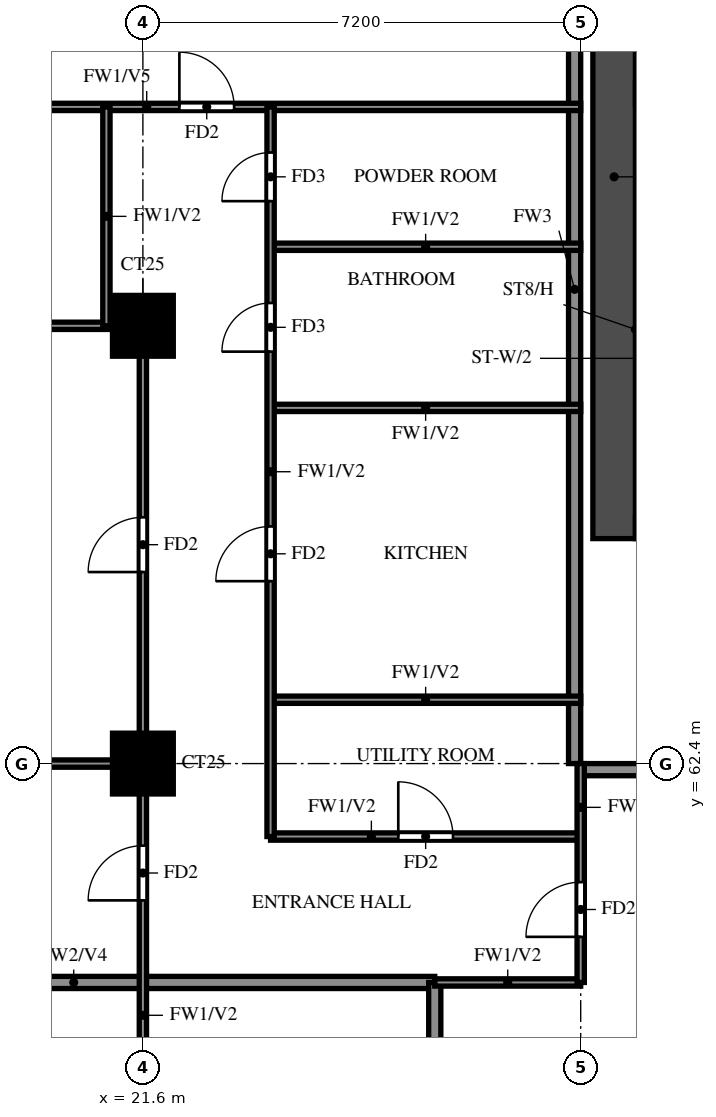
"""IFC4 building model, lengths in metres.
Left out: names, types, materials, properties, quantities, classifications, styles, units other than length and angle.
Written with IfcOpenShell. Run it as: python <this file> out.ifc"""

import sys

from ifc_helpers import new_model, si_unit, direction, frame, frame_2d, origin, origin_2d, place, context, subcontext, project, spatial, rectangle, extrude, source, transform, mapped, element, fill, save


model = new_model("IFC4")
c1 = context("Model", 3, precision=1e-05, world=origin(), true_north=direction((0.0, 1.0)))
c2 = subcontext(c1, "Body", "Model", "MODEL_VIEW")
j1 = project(units=[si_unit("LENGTHUNIT", "METRE"), si_unit("PLANEANGLEUNIT", "RADIAN")], contexts=[c1])
p1 = place(None, origin())
s1 = spatial("IfcSite", under=j1, at=p1, CompositionType="ELEMENT")
p2 = place(p1, origin())
s2 = spatial("IfcBuilding", under=s1, at=p2, CompositionType="ELEMENT")
p3 = place(p2, frame((0.0, 0.0, 153.5)))
s3 = spatial("IfcBuildingStorey", under=s2, at=p3, CompositionType="ELEMENT", Elevation=153.5)
m1 = source(origin(), c2, "Body", "SweptSolid", [
    extrude(rectangle(XDim=1.0, YDim=1.0, at=origin_2d()), origin(), (0.0, 0.0, 1.0), 3.2),
])
for number, where, z_axis, x_axis in (
    (1, (21.6, 62.4, 0.0), (0.0, 0.0, 1.0), (1.0, 0.0, 0.0)),
    (2, (21.6, 69.6, 0.0), (0.0, 0.0, 1.0), (1.0, 0.0, 0.0)),
):
    element("IfcColumn", number, at=place(p3, frame(where, z_axis=z_axis, x_axis=x_axis)), inside=s3, PredefinedType="COLUMN", context=c2, shape_type="MappedRepresentation", body=[
        mapped(m1, transform((0.0, 0.0, 0.0))),
    ])
p4 = place(p3, frame((29.35, 66.1, 0.0), z_axis=(0.0, 0.0, 1.0), x_axis=(0.0, 1.0, 0.0)))
e3 = element("IfcWall", 3, at=p4, inside=s3, PredefinedType="SHEAR", context=c2, shape_type="SweptSolid", body=[
    extrude(rectangle(XDim=11.9, YDim=0.7, at=frame_2d((5.95, 0.0))), origin(), (0.0, 0.0, 1.0), 3.2),
])
p5 = place(p3, frame((28.8, 62.3, 0.0), z_axis=(0.0, 0.0, 1.0), x_axis=(1.0, 0.0, 0.0)))
e4 = element("IfcWall", 4, at=p5, inside=s3, PredefinedType="SOLIDWALL", context=c2, shape_type="SweptSolid", body=[
    extrude(rectangle(XDim=4.8, YDim=0.2, at=frame_2d((2.4, 0.0))), origin(), (0.0, 0.0, 1.0), 3.2),
])
p6 = place(p3, frame((28.7, 62.4, 0.0), z_axis=(0.0, 0.0, 1.0), x_axis=(0.0, 1.0, 0.0)))
e5 = element("IfcWall", 5, at=p6, inside=s3, PredefinedType="SOLIDWALL", context=c2, shape_type="SweptSolid", body=[
    extrude(rectangle(XDim=15.6, YDim=0.2, at=frame_2d((7.8, 0.0))), origin(), (0.0, 0.0, 1.0), 3.2),
])
p7 = place(p3, frame((14.525, 58.8, 0.0), z_axis=(0.0, 0.0, 1.0), x_axis=(1.0, 0.0, 0.0)))
e6 = element("IfcWall", 6, at=p7, inside=s3, PredefinedType="SOLIDWALL", context=c2, shape_type="SweptSolid", body=[
    extrude(rectangle(XDim=11.875, YDim=0.2, at=frame_2d((5.938, 0.0))), origin(), (0.0, 0.0, 1.0), 2.3),
])
p8 = place(p3, frame((26.4, 56.4, 0.0), z_axis=(0.0, 0.0, 1.0), x_axis=(0.0, 1.0, 0.0)))
e7 = element("IfcWall", 7, at=p8, inside=s3, PredefinedType="SOLIDWALL", context=c2, shape_type="SweptSolid", body=[
    extrude(rectangle(XDim=2.4, YDim=0.2, at=frame_2d((1.2, 0.0))), origin(), (0.0, 0.0, 1.0), 3.2),
])
p9 = place(p3, frame((26.4, 58.8, 0.0), z_axis=(0.0, 0.0, 1.0), x_axis=(1.0, 0.0, 0.0)))
e8 = element("IfcWall", 8, at=p9, inside=s3, PredefinedType="PARTITIONING", context=c2, shape_type="SweptSolid", body=[
    extrude(rectangle(XDim=2.4, YDim=0.12, at=frame_2d((1.2, 0.0))), origin(), (0.0, 0.0, 1.0), 3.2),
])
p10 = place(p3, frame((23.7, 61.2, 0.0), z_axis=(0.0, 0.0, 1.0), x_axis=(1.0, 0.0, 0.0)))
e9 = element("IfcWall", 9, at=p10, inside=s3, PredefinedType="PARTITIONING", context=c2, shape_type="SweptSolid", body=[
    extrude(rectangle(XDim=5.1, YDim=0.12, at=frame_2d((2.55, 0.0))), origin(), (0.0, 0.0, 1.0), 3.2),
])
p11 = place(p10, frame((2.1, 0.0, 0.0)))
e10 = element("IfcOpeningElement", 10, at=p11, cuts=e9, PredefinedType="OPENING", context=c2, shape_type="SweptSolid", body=[
    extrude(rectangle(XDim=0.9, YDim=2.1, at=frame_2d((0.45, 1.05))), frame((0.0, 0.07, 0.0), z_axis=(0.0, -1.0, 0.0), x_axis=(1.0, 0.0, 0.0)), (0.0, 0.0, 1.0), 0.14),
])
p12 = place(p3, frame((14.525, 62.4, 0.0), z_axis=(0.0, 0.0, 1.0), x_axis=(1.0, 0.0, 0.0)))
e11 = element("IfcWall", 11, at=p12, inside=s3, PredefinedType="PARTITIONING", context=c2, shape_type="SweptSolid", body=[
    extrude(rectangle(XDim=7.075, YDim=0.12, at=frame_2d((3.538, 0.0))), origin(), (0.0, 0.0, 1.0), 3.2),
])
for number, where, z_axis, x_axis in (
    (12, (23.7, 63.45, 0.0), (0.0, 0.0, 1.0), (1.0, 0.0, 0.0)),
    (13, (23.7, 68.25, 0.0), (0.0, 0.0, 1.0), (1.0, 0.0, 0.0)),
):
    element("IfcWall", number, at=place(p3, frame(where, z_axis=z_axis, x_axis=x_axis)), inside=s3, PredefinedType="PARTITIONING", context=c2, shape_type="SweptSolid", body=[
        extrude(rectangle(XDim=5.1, YDim=0.12, at=frame_2d((2.55, 0.0))), origin(), (0.0, 0.0, 1.0), 3.2),
    ])
p13 = place(p3, frame((14.525, 69.6, 0.0), z_axis=(0.0, 0.0, 1.0), x_axis=(1.0, 0.0, 0.0)))
e14 = element("IfcWall", 14, at=p13, inside=s3, PredefinedType="PARTITIONING", context=c2, shape_type="SweptSolid", body=[
    extrude(rectangle(XDim=7.075, YDim=0.12, at=frame_2d((3.538, 0.0))), origin(), (0.0, 0.0, 1.0), 3.2),
])
p14 = place(p13, frame((2.837, 0.0, 0.0)))
e15 = element("IfcOpeningElement", 15, at=p14, cuts=e14, PredefinedType="OPENING", context=c2, shape_type="SweptSolid", body=[
    extrude(rectangle(XDim=0.8, YDim=2.1, at=frame_2d((0.4, 1.05))), frame((0.0, 0.07, 0.0), z_axis=(0.0, -1.0, 0.0), x_axis=(1.0, 0.0, 0.0)), (0.0, 0.0, 1.0), 0.14),
])
p15 = place(p3, frame((23.7, 70.9, 0.0), z_axis=(0.0, 0.0, 1.0), x_axis=(1.0, 0.0, 0.0)))
e16 = element("IfcWall", 16, at=p15, inside=s3, PredefinedType="PARTITIONING", context=c2, shape_type="SweptSolid", body=[
    extrude(rectangle(XDim=5.1, YDim=0.12, at=frame_2d((2.55, 0.0))), origin(), (0.0, 0.0, 1.0), 3.2),
])
p16 = place(p3, frame((14.525, 73.2, 0.0), z_axis=(0.0, 0.0, 1.0), x_axis=(1.0, 0.0, 0.0)))
e17 = element("IfcWall", 17, at=p16, inside=s3, PredefinedType="PARTITIONING", context=c2, shape_type="SweptSolid", body=[
    extrude(rectangle(XDim=14.275, YDim=0.12, at=frame_2d((7.138, 0.0))), origin(), (0.0, 0.0, 1.0), 2.3),
])
p17 = place(p16, frame((7.675, 0.0, 0.0)))
e18 = element("IfcOpeningElement", 18, at=p17, cuts=e17, PredefinedType="OPENING", context=c2, shape_type="SweptSolid", body=[
    extrude(rectangle(XDim=0.9, YDim=2.1, at=frame_2d((0.45, 1.05))), frame((0.0, 0.07, 0.0), z_axis=(0.0, -1.0, 0.0), x_axis=(1.0, 0.0, 0.0)), (0.0, 0.0, 1.0), 0.14),
])
p18 = place(p3, frame((21.0, 69.6, 0.0), z_axis=(0.0, 0.0, 1.0), x_axis=(0.0, 1.0, 0.0)))
e19 = element("IfcWall", 19, at=p18, inside=s3, PredefinedType="PARTITIONING", context=c2, shape_type="SweptSolid", body=[
    extrude(rectangle(XDim=3.6, YDim=0.12, at=frame_2d((1.8, 0.0))), origin(), (0.0, 0.0, 1.0), 3.2),
])
p19 = place(p3, frame((21.6, 48.0, 0.0), z_axis=(0.0, 0.0, 1.0), x_axis=(0.0, 1.0, 0.0)))
e20 = element("IfcWall", 20, at=p19, inside=s3, PredefinedType="PARTITIONING", context=c2, shape_type="SweptSolid", body=[
    extrude(rectangle(XDim=21.6, YDim=0.12, at=frame_2d((10.8, 0.0))), origin(), (0.0, 0.0, 1.0), 3.2),
])
p20 = place(p19, frame((2.85, 0.0, 0.0)))
e21 = element("IfcOpeningElement", 21, at=p20, cuts=e20, PredefinedType="OPENING", context=c2, shape_type="SweptSolid", body=[
    extrude(rectangle(XDim=1.5, YDim=2.1, at=frame_2d((0.75, 1.05))), frame((0.0, 0.07, 0.0), z_axis=(0.0, -1.0, 0.0), x_axis=(1.0, 0.0, 0.0)), (0.0, 0.0, 1.0), 0.14),
])
p21 = place(p19, frame((8.55, 0.0, 0.0)))
e22 = element("IfcOpeningElement", 22, at=p21, cuts=e20, PredefinedType="OPENING", context=c2, shape_type="SweptSolid", body=[
    extrude(rectangle(XDim=0.9, YDim=2.1, at=frame_2d((0.45, 1.05))), frame((0.0, 0.07, 0.0), z_axis=(0.0, -1.0, 0.0), x_axis=(1.0, 0.0, 0.0)), (0.0, 0.0, 1.0), 0.14),
])
p22 = place(p19, frame((12.15, 0.0, 0.0)))
e23 = element("IfcOpeningElement", 23, at=p22, cuts=e20, PredefinedType="OPENING", context=c2, shape_type="SweptSolid", body=[
    extrude(rectangle(XDim=0.9, YDim=2.1, at=frame_2d((0.45, 1.05))), frame((0.0, 0.07, 0.0), z_axis=(0.0, -1.0, 0.0), x_axis=(1.0, 0.0, 0.0)), (0.0, 0.0, 1.0), 0.14),
])
p23 = place(p19, frame((17.55, 0.0, 0.0)))
e24 = element("IfcOpeningElement", 24, at=p23, cuts=e20, PredefinedType="OPENING", context=c2, shape_type="SweptSolid", body=[
    extrude(rectangle(XDim=0.9, YDim=2.1, at=frame_2d((0.45, 1.05))), frame((0.0, 0.07, 0.0), z_axis=(0.0, -1.0, 0.0), x_axis=(1.0, 0.0, 0.0)), (0.0, 0.0, 1.0), 0.14),
])
p24 = place(p3, frame((23.7, 61.2, 0.0), z_axis=(0.0, 0.0, 1.0), x_axis=(0.0, 1.0, 0.0)))
e25 = element("IfcWall", 25, at=p24, inside=s3, PredefinedType="PARTITIONING", context=c2, shape_type="SweptSolid", body=[
    extrude(rectangle(XDim=12.0, YDim=0.12, at=frame_2d((6.0, 0.0))), origin(), (0.0, 0.0, 1.0), 3.2),
])
p25 = place(p24, frame((4.2, 0.0, 0.0)))
e26 = element("IfcOpeningElement", 26, at=p25, cuts=e25, PredefinedType="OPENING", context=c2, shape_type="SweptSolid", body=[
    extrude(rectangle(XDim=0.9, YDim=2.1, at=frame_2d((0.45, 1.05))), frame((0.0, 0.07, 0.0), z_axis=(0.0, -1.0, 0.0), x_axis=(1.0, 0.0, 0.0)), (0.0, 0.0, 1.0), 0.14),
])
p26 = place(p24, frame((7.975, 0.0, 0.0)))
e27 = element("IfcOpeningElement", 27, at=p26, cuts=e25, PredefinedType="OPENING", context=c2, shape_type="SweptSolid", body=[
    extrude(rectangle(XDim=0.8, YDim=2.1, at=frame_2d((0.4, 1.05))), frame((0.0, 0.07, 0.0), z_axis=(0.0, -1.0, 0.0), x_axis=(1.0, 0.0, 0.0)), (0.0, 0.0, 1.0), 0.14),
])
p27 = place(p24, frame((10.45, 0.0, 0.0)))
e28 = element("IfcOpeningElement", 28, at=p27, cuts=e25, PredefinedType="OPENING", context=c2, shape_type="SweptSolid", body=[
    extrude(rectangle(XDim=0.8, YDim=2.1, at=frame_2d((0.4, 1.05))), frame((0.0, 0.07, 0.0), z_axis=(0.0, -1.0, 0.0), x_axis=(1.0, 0.0, 0.0)), (0.0, 0.0, 1.0), 0.14),
])
p28 = place(p3, frame((28.8, 58.8, 0.0), z_axis=(0.0, 0.0, 1.0), x_axis=(0.0, 1.0, 0.0)))
e29 = element("IfcWall", 29, at=p28, inside=s3, PredefinedType="PARTITIONING", context=c2, shape_type="SweptSolid", body=[
    extrude(rectangle(XDim=3.6, YDim=0.12, at=frame_2d((1.8, 0.0))), origin(), (0.0, 0.0, 1.0), 3.2),
])
p29 = place(p28, frame((0.75, 0.0, 0.0)))
e30 = element("IfcOpeningElement", 30, at=p29, cuts=e29, PredefinedType="OPENING", context=c2, shape_type="SweptSolid", body=[
    extrude(rectangle(XDim=0.9, YDim=2.1, at=frame_2d((0.45, 1.05))), frame((0.0, 0.07, 0.0), z_axis=(0.0, -1.0, 0.0), x_axis=(1.0, 0.0, 0.0)), (0.0, 0.0, 1.0), 0.14),
])
p30 = place(p29, origin())
e31 = element("IfcDoor", 31, at=p30, inside=s3, OperationType="SINGLE_SWING_RIGHT", PredefinedType="DOOR", context=c2, shape_type="SweptSolid", body=[
    extrude(rectangle(XDim=0.9, YDim=2.1, at=frame_2d((0.45, 1.05))), frame((0.0, 0.025, 0.0), z_axis=(0.0, -1.0, 0.0), x_axis=(1.0, 0.0, 0.0)), (0.0, 0.0, 1.0), 0.05),
])
fill(e30, e31)
p31 = place(p22, origin())
e32 = element("IfcDoor", 32, at=p31, inside=s3, OperationType="SINGLE_SWING_LEFT", PredefinedType="DOOR", context=c2, shape_type="SweptSolid", body=[
    extrude(rectangle(XDim=0.9, YDim=2.1, at=frame_2d((0.45, 1.05))), frame((0.0, 0.025, 0.0), z_axis=(0.0, -1.0, 0.0), x_axis=(1.0, 0.0, 0.0)), (0.0, 0.0, 1.0), 0.05),
])
fill(e23, e32)
p32 = place(p23, origin())
e33 = element("IfcDoor", 33, at=p32, inside=s3, OperationType="SINGLE_SWING_RIGHT", PredefinedType="DOOR", context=c2, shape_type="SweptSolid", body=[
    extrude(rectangle(XDim=0.9, YDim=2.1, at=frame_2d((0.45, 1.05))), frame((0.0, 0.025, 0.0), z_axis=(0.0, -1.0, 0.0), x_axis=(1.0, 0.0, 0.0)), (0.0, 0.0, 1.0), 0.05),
])
fill(e24, e33)
p33 = place(p17, origin())
e34 = element("IfcDoor", 34, at=p33, inside=s3, OperationType="SINGLE_SWING_LEFT", PredefinedType="DOOR", context=c2, shape_type="SweptSolid", body=[
    extrude(rectangle(XDim=0.9, YDim=2.1, at=frame_2d((0.45, 1.05))), frame((0.0, 0.025, 0.0), z_axis=(0.0, -1.0, 0.0), x_axis=(1.0, 0.0, 0.0)), (0.0, 0.0, 1.0), 0.05),
])
fill(e18, e34)
p34 = place(p11, origin())
e35 = element("IfcDoor", 35, at=p34, inside=s3, OperationType="SINGLE_SWING_RIGHT", PredefinedType="DOOR", context=c2, shape_type="SweptSolid", body=[
    extrude(rectangle(XDim=0.9, YDim=2.1, at=frame_2d((0.45, 1.05))), frame((0.0, 0.025, 0.0), z_axis=(0.0, -1.0, 0.0), x_axis=(1.0, 0.0, 0.0)), (0.0, 0.0, 1.0), 0.05),
])
fill(e10, e35)
p35 = place(p25, origin())
e36 = element("IfcDoor", 36, at=p35, inside=s3, OperationType="SINGLE_SWING_LEFT", PredefinedType="DOOR", context=c2, shape_type="SweptSolid", body=[
    extrude(rectangle(XDim=0.9, YDim=2.1, at=frame_2d((0.45, 1.05))), frame((0.0, 0.025, 0.0), z_axis=(0.0, -1.0, 0.0), x_axis=(1.0, 0.0, 0.0)), (0.0, 0.0, 1.0), 0.05),
])
fill(e26, e36)
p36 = place(p26, origin())
e37 = element("IfcDoor", 37, at=p36, inside=s3, OperationType="SINGLE_SWING_LEFT", PredefinedType="DOOR", context=c2, shape_type="SweptSolid", body=[
    extrude(rectangle(XDim=0.8, YDim=2.1, at=frame_2d((0.4, 1.05))), frame((0.0, 0.025, 0.0), z_axis=(0.0, -1.0, 0.0), x_axis=(1.0, 0.0, 0.0)), (0.0, 0.0, 1.0), 0.05),
])
fill(e27, e37)
p37 = place(p27, origin())
e38 = element("IfcDoor", 38, at=p37, inside=s3, OperationType="SINGLE_SWING_RIGHT", PredefinedType="DOOR", context=c2, shape_type="SweptSolid", body=[
    extrude(rectangle(XDim=0.8, YDim=2.1, at=frame_2d((0.4, 1.05))), frame((0.0, 0.025, 0.0), z_axis=(0.0, -1.0, 0.0), x_axis=(1.0, 0.0, 0.0)), (0.0, 0.0, 1.0), 0.05),
])
fill(e28, e38)
save(model, sys.argv[1])
